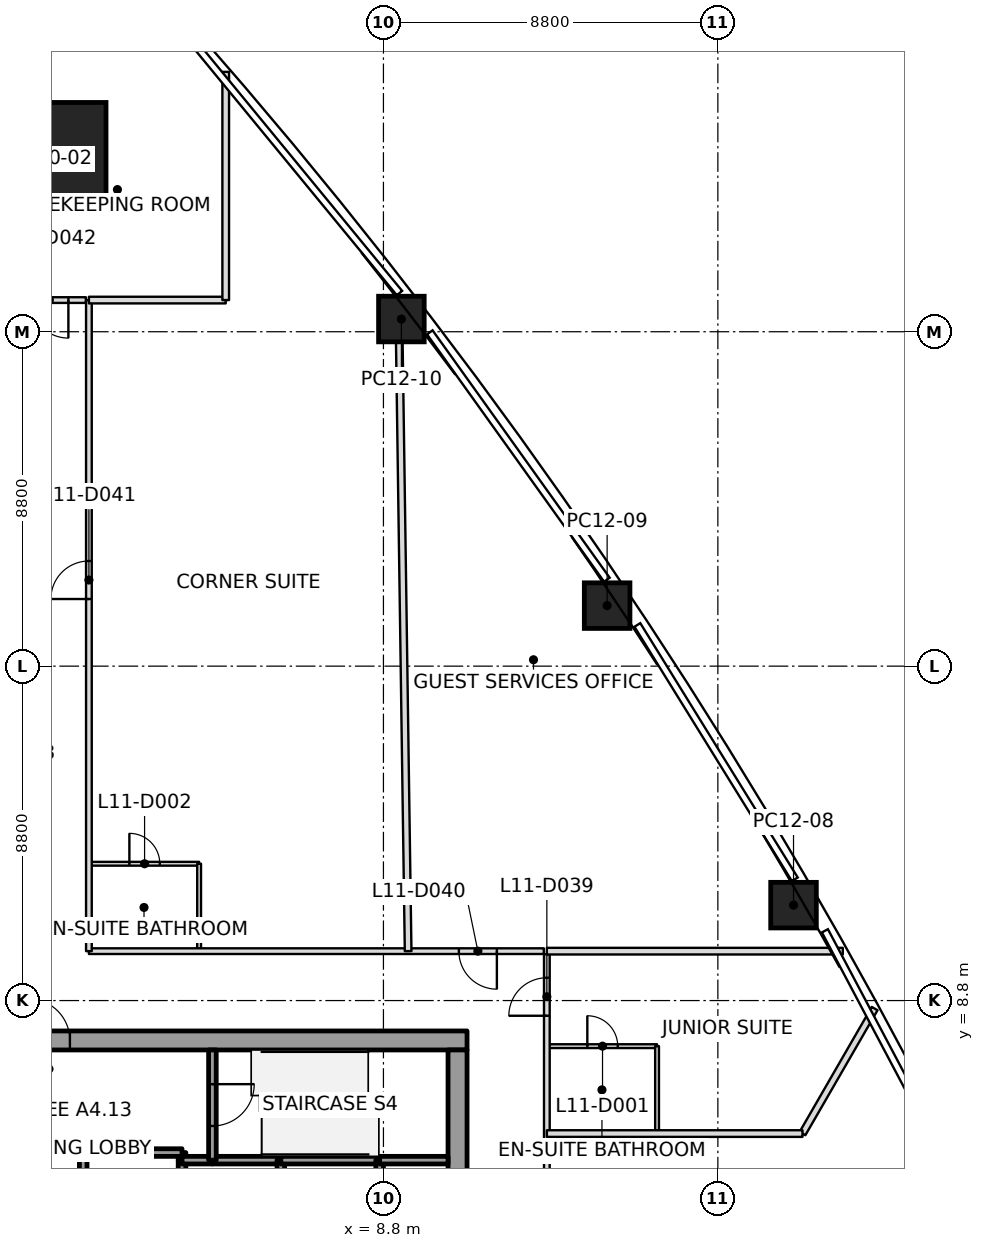
"""IFC4 building model, lengths in metres.
Left out: names, types, materials, properties, quantities, classifications, styles, units other than length and angle.
Written with IfcOpenShell. Run it as: python <this file> out.ifc"""

import sys

from ifc_helpers import new_model, si_unit, direction, frame, frame_2d, origin, origin_2d, place, context, subcontext, project, spatial, rectangle, extrude, element, fill, save


model = new_model("IFC4")
c1 = context("Model", 3, precision=1e-05, world=origin(), true_north=direction((0.0, 1.0)))
c2 = subcontext(c1, "Body", "Model", "MODEL_VIEW")
j1 = project(units=[si_unit("LENGTHUNIT", "METRE"), si_unit("PLANEANGLEUNIT", "RADIAN")], contexts=[c1])
p1 = place(None, origin())
s1 = spatial("IfcSite", under=j1, at=p1, CompositionType="ELEMENT")
p2 = place(p1, origin())
s2 = spatial("IfcBuilding", under=s1, at=p2, CompositionType="ELEMENT")
p3 = place(p2, frame((0.0, 0.0, 62.8)))
s3 = spatial("IfcBuildingStorey", under=s2, at=p3, CompositionType="ELEMENT", Elevation=62.8)
p4 = place(p3, frame((0.0, 30.933, 0.0), z_axis=(0.0, -0.035279904102, 0.999377470412), x_axis=(1.0, 0.0, 0.0)))
e1 = element("IfcColumn", 1, at=p4, inside=s3, PredefinedType="COLUMN", context=c2, shape_type="SweptSolid", body=[
    extrude(rectangle(XDim=3.0, YDim=3.0, at=origin_2d()), origin(), (0.0, 0.0, 1.0), 3.702),
])
p5 = place(p3, frame((19.591, 11.311, 0.0), z_axis=(-0.010754697325, -0.00620209539, 0.999922932279), x_axis=(-0.499971083285, 0.866042098195, -5.762411e-06)))
e2 = element("IfcColumn", 2, at=p5, inside=s3, PredefinedType="COLUMN", context=c2, shape_type="SweptSolid", body=[
    extrude(rectangle(XDim=1.2, YDim=1.2, at=origin_2d()), origin(), (0.0, 0.0, 1.0), 3.7),
])
p6 = place(p3, frame((14.686, 19.193, 0.0), z_axis=(-0.005674016471, -0.014382971985, 0.999880460682), x_axis=(-0.556042983249, 0.831106950726, 0.00879984287)))
e3 = element("IfcColumn", 3, at=p6, inside=s3, PredefinedType="COLUMN", context=c2, shape_type="SweptSolid", body=[
    extrude(rectangle(XDim=1.2, YDim=1.2, at=origin_2d()), origin(), (0.0, 0.0, 1.0), 3.7),
])
p7 = place(p3, frame((9.272, 26.734, 0.0), z_axis=(-0.000263873276, -0.02236326018, 0.999749876202), x_axis=(-0.609679031442, 0.792453744126, 0.017565364773)))
e4 = element("IfcColumn", 4, at=p7, inside=s3, PredefinedType="COLUMN", context=c2, shape_type="SweptSolid", body=[
    extrude(rectangle(XDim=1.2, YDim=1.2, at=origin_2d()), origin(), (0.0, 0.0, 1.0), 3.701),
])
p8 = place(p3, frame((-11.0, 7.75, 0.0), z_axis=(0.0, 0.0, 1.0), x_axis=(1.0, 0.0, 0.0)))
e5 = element("IfcWall", 5, at=p8, inside=s3, PredefinedType="SHEAR", context=c2, shape_type="SweptSolid", body=[
    extrude(rectangle(XDim=22.0, YDim=0.5, at=frame_2d((11.0, 0.0))), origin(), (0.0, 0.0, 1.0), 3.7),
])
p9 = place(p8, frame((10.45, 0.0, 0.0)))
e6 = element("IfcOpeningElement", 6, at=p9, cuts=e5, PredefinedType="OPENING", context=c2, shape_type="SweptSolid", body=[
    extrude(rectangle(XDim=1.1, YDim=2.1, at=frame_2d((0.55, 1.05))), frame((0.0, 0.25, 0.0), z_axis=(0.0, -1.0, 0.0), x_axis=(1.0, 0.0, 0.0)), (0.0, 0.0, 1.0), 0.5),
])
p10 = place(p3, frame((10.75, -7.5, 0.0), z_axis=(0.0, 0.0, 1.0), x_axis=(0.0, 1.0, 0.0)))
e7 = element("IfcWall", 7, at=p10, inside=s3, PredefinedType="SHEAR", context=c2, shape_type="SweptSolid", body=[
    extrude(rectangle(XDim=15.0, YDim=0.5, at=frame_2d((7.5, 0.0))), origin(), (0.0, 0.0, 1.0), 3.7),
])
p11 = place(p10, frame((6.6, 0.0, 0.0)))
e8 = element("IfcOpeningElement", 8, at=p11, cuts=e7, PredefinedType="OPENING", context=c2, shape_type="SweptSolid", body=[
    extrude(rectangle(XDim=1.8, YDim=2.1, at=frame_2d((0.9, 1.05))), frame((0.0, 0.25, 0.0), z_axis=(0.0, -1.0, 0.0), x_axis=(1.0, 0.0, 0.0)), (0.0, 0.0, 1.0), 0.5),
])
p12 = place(p3, frame((3.5, 4.6, 0.0), z_axis=(0.0, 0.0, 1.0), x_axis=(0.0, 1.0, 0.0)))
e9 = element("IfcWall", 9, at=p12, inside=s3, PredefinedType="SOLIDWALL", context=c2, shape_type="SweptSolid", body=[
    extrude(rectangle(XDim=0.2, YDim=0.2, at=frame_2d((0.1, 0.0))), origin(), (0.0, 0.0, 1.0), 3.55),
])
p13 = place(p3, frame((3.5, 4.8, 0.0), z_axis=(0.0, 0.0, 1.0), x_axis=(-1.0, 0.0, 0.0)))
e10 = element("IfcWall", 10, at=p13, inside=s3, PredefinedType="SOLIDWALL", context=c2, shape_type="SweptSolid", body=[
    extrude(rectangle(XDim=2.6, YDim=0.2, at=frame_2d((1.3, 0.0))), origin(), (0.0, 0.0, 1.0), 3.55),
])
p14 = place(p3, frame((0.9, 4.8, 0.0), z_axis=(0.0, 0.0, 1.0), x_axis=(0.0, -1.0, 0.0)))
e11 = element("IfcWall", 11, at=p14, inside=s3, PredefinedType="SOLIDWALL", context=c2, shape_type="SweptSolid", body=[
    extrude(rectangle(XDim=3.0, YDim=0.2, at=frame_2d((1.5, 0.0))), origin(), (0.0, 0.0, 1.0), 3.55),
])
p15 = place(p14, frame((0.9, 0.0, 0.0)))
e12 = element("IfcOpeningElement", 12, at=p15, cuts=e11, PredefinedType="OPENING", context=c2, shape_type="SweptSolid", body=[
    extrude(rectangle(XDim=1.2, YDim=2.1, at=frame_2d((0.6, 1.05))), frame((0.0, 0.1, 0.0), z_axis=(0.0, -1.0, 0.0), x_axis=(1.0, 0.0, 0.0)), (0.0, 0.0, 1.0), 0.2),
])
p16 = place(p3, frame((3.5, 1.8, 0.0), z_axis=(0.0, 0.0, 1.0), x_axis=(0.0, 1.0, 0.0)))
e13 = element("IfcWall", 13, at=p16, inside=s3, PredefinedType="SOLIDWALL", context=c2, shape_type="SweptSolid", body=[
    extrude(rectangle(XDim=2.8, YDim=0.2, at=frame_2d((1.4, 0.0))), origin(), (0.0, 0.0, 1.0), 3.55),
])
p17 = place(p3, frame((4.3, 4.6, 0.0), z_axis=(0.0, 0.0, 1.0), x_axis=(-1.0, 0.0, 0.0)))
e14 = element("IfcWall", 14, at=p17, inside=s3, PredefinedType="SOLIDWALL", context=c2, shape_type="SweptSolid", body=[
    extrude(rectangle(XDim=0.8, YDim=0.2, at=frame_2d((0.4, 0.0))), origin(), (0.0, 0.0, 1.0), 3.55),
])
p18 = place(p3, frame((6.1, 4.6, 0.0), z_axis=(0.0, 0.0, 1.0), x_axis=(-1.0, 0.0, 0.0)))
e15 = element("IfcWall", 15, at=p18, inside=s3, PredefinedType="SOLIDWALL", context=c2, shape_type="SweptSolid", body=[
    extrude(rectangle(XDim=1.8, YDim=0.2, at=frame_2d((0.9, 0.0))), origin(), (0.0, 0.0, 1.0), 3.55),
])
p19 = place(p3, frame((4.3, 7.5, 0.0), z_axis=(0.0, 0.0, 1.0), x_axis=(0.0, -1.0, 0.0)))
e16 = element("IfcWall", 16, at=p19, inside=s3, PredefinedType="SOLIDWALL", context=c2, shape_type="SweptSolid", body=[
    extrude(rectangle(XDim=2.9, YDim=0.2, at=frame_2d((1.45, 0.0))), origin(), (0.0, 0.0, 1.0), 3.55),
])
p20 = place(p19, frame((0.9, 0.0, 0.0)))
e17 = element("IfcOpeningElement", 17, at=p20, cuts=e16, PredefinedType="OPENING", context=c2, shape_type="SweptSolid", body=[
    extrude(rectangle(XDim=1.1, YDim=2.1, at=frame_2d((0.55, 1.05))), frame((0.0, 0.1, 0.0), z_axis=(0.0, -1.0, 0.0), x_axis=(1.0, 0.0, 0.0)), (0.0, 0.0, 1.0), 0.2),
])
p21 = place(p3, frame((6.1, 1.8, 0.0), z_axis=(0.0, 0.0, 1.0), x_axis=(0.0, 1.0, 0.0)))
e18 = element("IfcWall", 18, at=p21, inside=s3, PredefinedType="SOLIDWALL", context=c2, shape_type="SweptSolid", body=[
    extrude(rectangle(XDim=2.8, YDim=0.2, at=frame_2d((1.4, 0.0))), origin(), (0.0, 0.0, 1.0), 3.55),
])
p22 = place(p3, frame((8.7, 4.6, 0.0), z_axis=(0.0, 0.0, 1.0), x_axis=(-1.0, 0.0, 0.0)))
e19 = element("IfcWall", 19, at=p22, inside=s3, PredefinedType="SOLIDWALL", context=c2, shape_type="SweptSolid", body=[
    extrude(rectangle(XDim=2.6, YDim=0.2, at=frame_2d((1.3, 0.0))), origin(), (0.0, 0.0, 1.0), 3.55),
])
p23 = place(p3, frame((8.7, 4.6, 0.0), z_axis=(0.0, 0.0, 1.0), x_axis=(0.0, -1.0, 0.0)))
e20 = element("IfcWall", 20, at=p23, inside=s3, PredefinedType="SOLIDWALL", context=c2, shape_type="SweptSolid", body=[
    extrude(rectangle(XDim=2.8, YDim=0.2, at=frame_2d((1.4, 0.0))), origin(), (0.0, 0.0, 1.0), 3.55),
])
p24 = place(p3, frame((10.5, 4.6, 0.0), z_axis=(0.0, 0.0, 1.0), x_axis=(-1.0, 0.0, 0.0)))
e21 = element("IfcWall", 21, at=p24, inside=s3, PredefinedType="SOLIDWALL", context=c2, shape_type="SweptSolid", body=[
    extrude(rectangle(XDim=1.8, YDim=0.2, at=frame_2d((0.9, 0.0))), origin(), (0.0, 0.0, 1.0), 3.55),
])
p25 = place(p3, frame((1.05, 27.233, 0.0), z_axis=(0.0, 0.0, 1.0), x_axis=(1.0, 0.0, 0.0)))
e22 = element("IfcWall", 22, at=p25, inside=s3, PredefinedType="PARTITIONING", context=c2, shape_type="SweptSolid", body=[
    extrude(rectangle(XDim=3.6, YDim=0.175, at=frame_2d((1.8, 0.0))), origin(), (0.0, 0.0, 1.0), 3.15),
])
p26 = place(p3, frame((4.65, 27.233, 0.0), z_axis=(0.0, 0.0, 1.0), x_axis=(0.0, 1.0, 0.0)))
e23 = element("IfcWall", 23, at=p26, inside=s3, PredefinedType="PARTITIONING", context=c2, shape_type="SweptSolid", body=[
    extrude(rectangle(XDim=6.005, YDim=0.175, at=frame_2d((3.002, 0.0))), origin(), (0.0, 0.0, 1.0), 2.934),
])
p27 = place(p3, frame((9.2, 27.344, 0.0), z_axis=(0.0, 0.0, 1.0), x_axis=(0.014495949577, -0.999894928203, 0.0)))
e24 = element("IfcWall", 24, at=p27, inside=s3, PredefinedType="PARTITIONING", context=c2, shape_type="SweptSolid", body=[
    extrude(rectangle(XDim=17.246, YDim=0.175, at=frame_2d((8.623, 0.0))), origin(), (0.0, 0.0, 1.0), 2.947),
])
p28 = place(p3, frame((21.726, 8.589, 0.0), z_axis=(0.0, 0.0, 1.0), x_axis=(-0.500024807712, -0.866011080572, 0.0)))
e25 = element("IfcWall", 25, at=p28, inside=s3, PredefinedType="PARTITIONING", context=c2, shape_type="SweptSolid", body=[
    extrude(rectangle(XDim=3.798, YDim=0.175, at=frame_2d((1.899, 0.0))), origin(), (0.0, 0.0, 1.0), 2.934),
])
p29 = place(p3, frame((19.827, 5.3, 0.0), z_axis=(0.0, 0.0, 1.0), x_axis=(-1.0, 0.0, 0.0)))
e26 = element("IfcWall", 26, at=p29, inside=s3, PredefinedType="PARTITIONING", context=c2, shape_type="SweptSolid", body=[
    extrude(rectangle(XDim=6.727, YDim=0.175, at=frame_2d((3.363, 0.0))), origin(), (0.0, 0.0, 1.0), 3.093),
])
p30 = place(p3, frame((13.1, 10.1, 0.0), z_axis=(0.0, 0.0, 1.0), x_axis=(1.0, 0.0, 0.0)))
e27 = element("IfcWall", 27, at=p30, inside=s3, PredefinedType="PARTITIONING", context=c2, shape_type="SweptSolid", body=[
    extrude(rectangle(XDim=7.788, YDim=0.175, at=frame_2d((3.894, 0.0))), origin(), (0.0, 0.0, 1.0), 2.934),
])
p31 = place(p3, frame((0.97, 27.233, 0.0), z_axis=(0.0, 0.0, 1.0), x_axis=(-1.0, 0.0, 0.0)))
e28 = element("IfcWall", 28, at=p31, inside=s3, PredefinedType="PARTITIONING", context=c2, shape_type="SweptSolid", body=[
    extrude(rectangle(XDim=2.02, YDim=0.15, at=frame_2d((1.01, 0.0))), origin(), (0.0, 0.0, 1.0), 2.797),
])
p32 = place(p31, frame((0.46, 0.0, 0.0)))
e29 = element("IfcOpeningElement", 29, at=p32, cuts=e28, PredefinedType="OPENING", context=c2, shape_type="SweptSolid", body=[
    extrude(rectangle(XDim=1.0, YDim=2.1, at=frame_2d((0.5, 1.05))), frame((0.0, 0.075, 0.0), z_axis=(0.0, -1.0, 0.0), x_axis=(1.0, 0.0, 0.0)), (0.0, 0.0, 1.0), 0.15),
])
p33 = place(p3, frame((13.02, 10.1, 0.0), z_axis=(0.0, 0.0, 1.0), x_axis=(-1.0, 0.0, 0.0)))
e30 = element("IfcWall", 30, at=p33, inside=s3, PredefinedType="PARTITIONING", context=c2, shape_type="SweptSolid", body=[
    extrude(rectangle(XDim=11.97, YDim=0.15, at=frame_2d((5.985, 0.0))), origin(), (0.0, 0.0, 1.0), 2.947),
])
p34 = place(p33, frame((1.235, 0.0, 0.0)))
e31 = element("IfcOpeningElement", 31, at=p34, cuts=e30, PredefinedType="OPENING", context=c2, shape_type="SweptSolid", body=[
    extrude(rectangle(XDim=1.0, YDim=2.1, at=frame_2d((0.5, 1.05))), frame((0.0, 0.075, 0.0), z_axis=(0.0, -1.0, 0.0), x_axis=(1.0, 0.0, 0.0)), (0.0, 0.0, 1.0), 0.15),
])
p35 = place(p3, frame((1.05, 10.1, 0.0), z_axis=(0.0, 0.0, 1.0), x_axis=(0.0, 1.0, 0.0)))
e32 = element("IfcWall", 32, at=p35, inside=s3, PredefinedType="PARTITIONING", context=c2, shape_type="SweptSolid", body=[
    extrude(rectangle(XDim=17.133, YDim=0.15, at=frame_2d((8.566, 0.0))), origin(), (0.0, 0.0, 1.0), 2.947),
])
p36 = place(p35, frame((9.267, 0.0, 0.0)))
e33 = element("IfcOpeningElement", 33, at=p36, cuts=e32, PredefinedType="OPENING", context=c2, shape_type="SweptSolid", body=[
    extrude(rectangle(XDim=1.0, YDim=2.1, at=frame_2d((0.5, 1.05))), frame((0.0, 0.075, 0.0), z_axis=(0.0, -1.0, 0.0), x_axis=(1.0, 0.0, 0.0)), (0.0, 0.0, 1.0), 0.15),
])
p37 = place(p3, frame((13.1, -6.351, 0.0), z_axis=(0.0, 0.0, 1.0), x_axis=(0.0, 1.0, 0.0)))
e34 = element("IfcWall", 34, at=p37, inside=s3, PredefinedType="PARTITIONING", context=c2, shape_type="SweptSolid", body=[
    extrude(rectangle(XDim=16.371, YDim=0.15, at=frame_2d((8.186, 0.0))), origin(), (0.0, 0.0, 1.0), 3.017),
])
p38 = place(p37, frame((14.751, 0.0, 0.0)))
e35 = element("IfcOpeningElement", 35, at=p38, cuts=e34, PredefinedType="OPENING", context=c2, shape_type="SweptSolid", body=[
    extrude(rectangle(XDim=1.0, YDim=2.1, at=frame_2d((0.5, 1.05))), frame((0.0, 0.075, 0.0), z_axis=(0.0, -1.0, 0.0), x_axis=(1.0, 0.0, 0.0)), (0.0, 0.0, 1.0), 0.15),
])
p39 = place(p37, frame((6.525, 0.0, 0.0)))
e36 = element("IfcOpeningElement", 36, at=p39, cuts=e34, PredefinedType="OPENING", context=c2, shape_type="SweptSolid", body=[
    extrude(rectangle(XDim=1.0, YDim=2.1, at=frame_2d((0.5, 1.05))), frame((0.0, 0.075, 0.0), z_axis=(0.0, -1.0, 0.0), x_axis=(1.0, 0.0, 0.0)), (0.0, 0.0, 1.0), 0.15),
])
p40 = place(p3, frame((1.08, 12.4, 0.0), z_axis=(0.0, 0.0, 1.0), x_axis=(1.0, 0.0, 0.0)))
e37 = element("IfcWall", 37, at=p40, inside=s3, PredefinedType="PARTITIONING", context=c2, shape_type="SweptSolid", body=[
    extrude(rectangle(XDim=2.87, YDim=0.1, at=frame_2d((1.435, 0.0))), origin(), (0.0, 0.0, 1.0), 3.15),
])
p41 = place(p40, frame((1.035, 0.0, 0.0)))
e38 = element("IfcOpeningElement", 38, at=p41, cuts=e37, PredefinedType="OPENING", context=c2, shape_type="SweptSolid", body=[
    extrude(rectangle(XDim=0.8, YDim=2.1, at=frame_2d((0.4, 1.05))), frame((0.0, 0.05, 0.0), z_axis=(0.0, -1.0, 0.0), x_axis=(1.0, 0.0, 0.0)), (0.0, 0.0, 1.0), 0.1),
])
p42 = place(p3, frame((3.95, 12.4, 0.0), z_axis=(0.0, 0.0, 1.0), x_axis=(0.0, -1.0, 0.0)))
e39 = element("IfcWall", 39, at=p42, inside=s3, PredefinedType="PARTITIONING", context=c2, shape_type="SweptSolid", body=[
    extrude(rectangle(XDim=2.27, YDim=0.1, at=frame_2d((1.135, 0.0))), origin(), (0.0, 0.0, 1.0), 3.15),
])
p43 = place(p3, frame((13.13, 7.6, 0.0), z_axis=(0.0, 0.0, 1.0), x_axis=(1.0, 0.0, 0.0)))
e40 = element("IfcWall", 40, at=p43, inside=s3, PredefinedType="PARTITIONING", context=c2, shape_type="SweptSolid", body=[
    extrude(rectangle(XDim=2.87, YDim=0.1, at=frame_2d((1.435, 0.0))), origin(), (0.0, 0.0, 1.0), 3.15),
])
p44 = place(p43, frame((1.035, 0.0, 0.0)))
e41 = element("IfcOpeningElement", 41, at=p44, cuts=e40, PredefinedType="OPENING", context=c2, shape_type="SweptSolid", body=[
    extrude(rectangle(XDim=0.8, YDim=2.1, at=frame_2d((0.4, 1.05))), frame((0.0, 0.05, 0.0), z_axis=(0.0, -1.0, 0.0), x_axis=(1.0, 0.0, 0.0)), (0.0, 0.0, 1.0), 0.1),
])
p45 = place(p3, frame((16.0, 7.6, 0.0), z_axis=(0.0, 0.0, 1.0), x_axis=(0.0, -1.0, 0.0)))
e42 = element("IfcWall", 42, at=p45, inside=s3, PredefinedType="PARTITIONING", context=c2, shape_type="SweptSolid", body=[
    extrude(rectangle(XDim=2.27, YDim=0.1, at=frame_2d((1.135, 0.0))), origin(), (0.0, 0.0, 1.0), 3.093),
])
p46 = place(p38, origin())
e43 = element("IfcDoor", 43, at=p46, inside=s3, OperationType="SINGLE_SWING_LEFT", PredefinedType="DOOR", context=c2, shape_type="SweptSolid", body=[
    extrude(rectangle(XDim=1.0, YDim=2.1, at=frame_2d((0.5, 1.05))), frame((0.0, 0.025, 0.0), z_axis=(0.0, -1.0, 0.0), x_axis=(1.0, 0.0, 0.0)), (0.0, 0.0, 1.0), 0.05),
])
fill(e35, e43)
p47 = place(p44, origin())
e44 = element("IfcDoor", 44, at=p47, inside=s3, OperationType="SINGLE_SWING_LEFT", PredefinedType="DOOR", context=c2, shape_type="SweptSolid", body=[
    extrude(rectangle(XDim=0.8, YDim=2.1, at=frame_2d((0.4, 1.05))), frame((0.0, 0.025, 0.0), z_axis=(0.0, -1.0, 0.0), x_axis=(1.0, 0.0, 0.0)), (0.0, 0.0, 1.0), 0.05),
])
fill(e41, e44)
p48 = place(p34, origin())
e45 = element("IfcDoor", 45, at=p48, inside=s3, OperationType="SINGLE_SWING_RIGHT", PredefinedType="DOOR", context=c2, shape_type="SweptSolid", body=[
    extrude(rectangle(XDim=1.0, YDim=2.1, at=frame_2d((0.5, 1.05))), frame((0.0, 0.025, 0.0), z_axis=(0.0, -1.0, 0.0), x_axis=(1.0, 0.0, 0.0)), (0.0, 0.0, 1.0), 0.05),
])
fill(e31, e45)
p49 = place(p36, origin())
e46 = element("IfcDoor", 46, at=p49, inside=s3, OperationType="SINGLE_SWING_RIGHT", PredefinedType="DOOR", context=c2, shape_type="SweptSolid", body=[
    extrude(rectangle(XDim=1.0, YDim=2.1, at=frame_2d((0.5, 1.05))), frame((0.0, 0.025, 0.0), z_axis=(0.0, -1.0, 0.0), x_axis=(1.0, 0.0, 0.0)), (0.0, 0.0, 1.0), 0.05),
])
fill(e33, e46)
p50 = place(p41, origin())
e47 = element("IfcDoor", 47, at=p50, inside=s3, OperationType="SINGLE_SWING_LEFT", PredefinedType="DOOR", context=c2, shape_type="SweptSolid", body=[
    extrude(rectangle(XDim=0.8, YDim=2.1, at=frame_2d((0.4, 1.05))), frame((0.0, 0.025, 0.0), z_axis=(0.0, -1.0, 0.0), x_axis=(1.0, 0.0, 0.0)), (0.0, 0.0, 1.0), 0.05),
])
fill(e38, e47)
p51 = place(p32, origin())
e48 = element("IfcDoor", 48, at=p51, inside=s3, OperationType="SINGLE_SWING_LEFT", PredefinedType="DOOR", context=c2, shape_type="SweptSolid", body=[
    extrude(rectangle(XDim=1.0, YDim=2.1, at=frame_2d((0.5, 1.05))), frame((0.0, 0.025, 0.0), z_axis=(0.0, -1.0, 0.0), x_axis=(1.0, 0.0, 0.0)), (0.0, 0.0, 1.0), 0.05),
])
fill(e29, e48)
p52 = place(p20, origin())
e49 = element("IfcDoor", 49, at=p52, inside=s3, OperationType="SINGLE_SWING_LEFT", PredefinedType="DOOR", context=c2, shape_type="SweptSolid", body=[
    extrude(rectangle(XDim=1.1, YDim=2.1, at=frame_2d((0.55, 1.05))), frame((0.0, 0.025, 0.0), z_axis=(0.0, -1.0, 0.0), x_axis=(1.0, 0.0, 0.0)), (0.0, 0.0, 1.0), 0.05),
])
fill(e17, e49)
p53 = place(p9, origin())
e50 = element("IfcDoor", 50, at=p53, inside=s3, OperationType="SINGLE_SWING_RIGHT", PredefinedType="DOOR", context=c2, shape_type="SweptSolid", body=[
    extrude(rectangle(XDim=1.1, YDim=2.1, at=frame_2d((0.55, 1.05))), frame((0.0, 0.025, 0.0), z_axis=(0.0, -1.0, 0.0), x_axis=(1.0, 0.0, 0.0)), (0.0, 0.0, 1.0), 0.05),
])
fill(e6, e50)
save(model, sys.argv[1])
